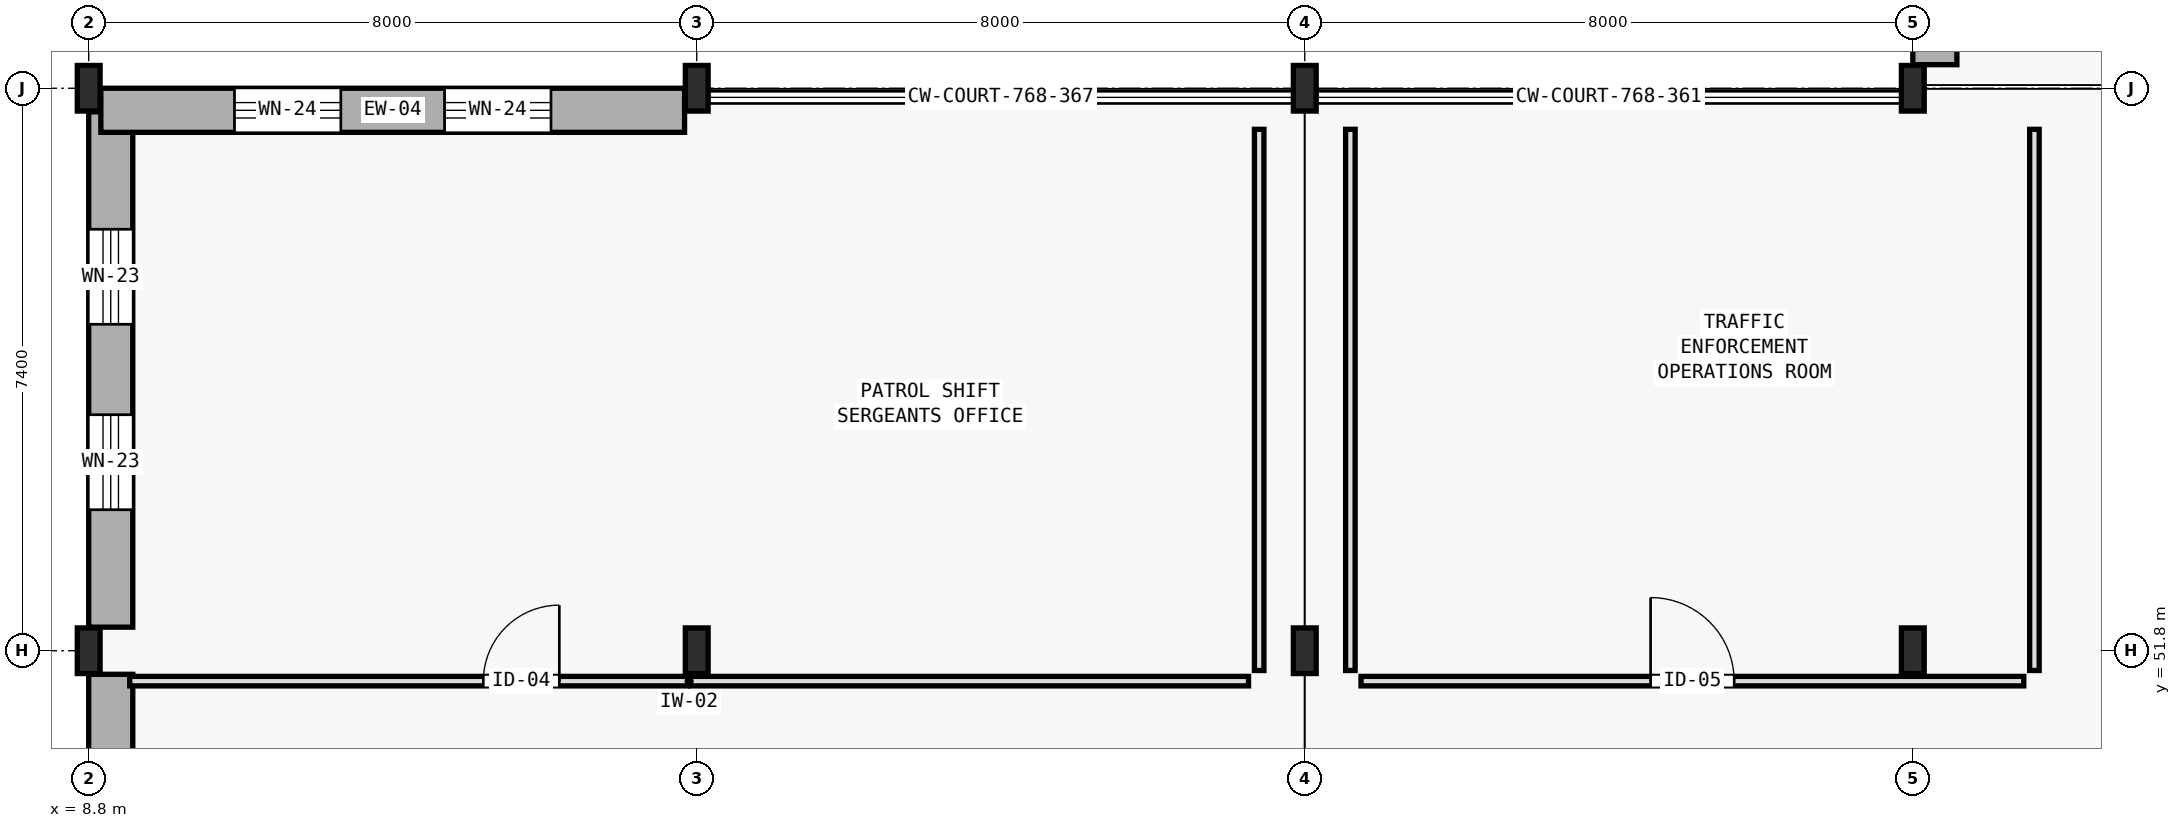
"""IFC4 building model, lengths in metres.
Left out: names, types, materials, properties, quantities, classifications, styles, units other than length and angle.
Written with IfcOpenShell. Run it as: python <this file> out.ifc"""

import sys

from ifc_helpers import new_model, si_unit, direction, frame, frame_2d, origin, origin_2d, place, context, subcontext, project, spatial, rectangle, i_section, extrude, element, fill, save


model = new_model("IFC4")
c1 = context("Model", 3, precision=1e-05, world=origin(), true_north=direction((0.0, 1.0)))
c2 = subcontext(c1, "Body", "Model", "MODEL_VIEW")
j1 = project(units=[si_unit("LENGTHUNIT", "METRE"), si_unit("PLANEANGLEUNIT", "RADIAN")], contexts=[c1])
p1 = place(None, origin())
s1 = spatial("IfcSite", under=j1, at=p1, CompositionType="ELEMENT")
p2 = place(p1, origin())
s2 = spatial("IfcBuilding", under=s1, at=p2, CompositionType="ELEMENT")
p3 = place(p2, frame((0.0, 0.0, 5.4)))
s3 = spatial("IfcBuildingStorey", under=s2, at=p3, CompositionType="ELEMENT", Elevation=5.4)
for number, where, z_axis, x_axis in (
    (1, (8.8, 51.8, 0.0), (0.0, 0.0, 1.0), (1.0, 0.0, 0.0)),
    (2, (8.8, 59.2, 0.0), (0.0, 0.0, 1.0), (1.0, 0.0, 0.0)),
    (3, (16.8, 51.8, 0.0), (0.0, 0.0, 1.0), (1.0, 0.0, 0.0)),
    (4, (16.8, 59.2, 0.0), (0.0, 0.0, 1.0), (1.0, 0.0, 0.0)),
    (5, (24.8, 51.8, 0.0), (0.0, 0.0, 1.0), (1.0, 0.0, 0.0)),
    (6, (24.8, 59.2, 0.0), (0.0, 0.0, 1.0), (1.0, 0.0, 0.0)),
    (7, (32.8, 51.8, 0.0), (0.0, 0.0, 1.0), (1.0, 0.0, 0.0)),
    (8, (32.8, 59.2, 0.0), (0.0, 0.0, 1.0), (1.0, 0.0, 0.0)),
):
    element("IfcColumn", number, at=place(p3, frame(where, z_axis=z_axis, x_axis=x_axis)), inside=s3, PredefinedType="COLUMN", context=c2, shape_type="SweptSolid", body=[
        extrude(i_section(OverallWidth=0.3, OverallDepth=0.6, WebThickness=0.015, FlangeThickness=0.03, FilletRadius=0.027, at=origin_2d()), origin(), (0.0, 0.0, 1.0), 4.5),
    ])
p4 = place(p3, frame((9.09, 44.71, 0.0), z_axis=(0.0, 0.0, 1.0), x_axis=(0.0, 1.0, 0.0)))
e9 = element("IfcWall", 9, at=p4, inside=s3, PredefinedType="STANDARD", context=c2, shape_type="SweptSolid", body=[
    extrude(rectangle(XDim=6.78, YDim=0.58, at=frame_2d((3.39, 0.0))), origin(), (0.0, 0.0, 1.0), 4.24),
])
p5 = place(p4, frame((1.545, 0.0, 0.9)))
e10 = element("IfcOpeningElement", 10, at=p5, cuts=e9, PredefinedType="OPENING", context=c2, shape_type="SweptSolid", body=[
    extrude(rectangle(XDim=1.25, YDim=2.05, at=frame_2d((0.625, 1.025))), frame((0.0, 0.3, 0.0), z_axis=(0.0, -1.0, 0.0), x_axis=(1.0, 0.0, 0.0)), (0.0, 0.0, 1.0), 0.6),
])
p6 = place(p4, frame((3.985, 0.0, 0.9)))
e11 = element("IfcOpeningElement", 11, at=p6, cuts=e9, PredefinedType="OPENING", context=c2, shape_type="SweptSolid", body=[
    extrude(rectangle(XDim=1.25, YDim=2.05, at=frame_2d((0.625, 1.025))), frame((0.0, 0.3, 0.0), z_axis=(0.0, -1.0, 0.0), x_axis=(1.0, 0.0, 0.0)), (0.0, 0.0, 1.0), 0.6),
])
p7 = place(p3, frame((9.09, 52.11, 0.0), z_axis=(0.0, 0.0, 1.0), x_axis=(0.0, 1.0, 0.0)))
e12 = element("IfcWall", 12, at=p7, inside=s3, PredefinedType="STANDARD", context=c2, shape_type="SweptSolid", body=[
    extrude(rectangle(XDim=6.78, YDim=0.58, at=frame_2d((3.39, 0.0))), origin(), (0.0, 0.0, 1.0), 4.24),
])
p8 = place(p7, frame((1.545, 0.0, 0.9)))
e13 = element("IfcOpeningElement", 13, at=p8, cuts=e12, PredefinedType="OPENING", context=c2, shape_type="SweptSolid", body=[
    extrude(rectangle(XDim=1.25, YDim=2.45, at=frame_2d((0.625, 1.225))), frame((0.0, 0.3, 0.0), z_axis=(0.0, -1.0, 0.0), x_axis=(1.0, 0.0, 0.0)), (0.0, 0.0, 1.0), 0.6),
])
p9 = place(p7, frame((3.985, 0.0, 0.9)))
e14 = element("IfcOpeningElement", 14, at=p9, cuts=e12, PredefinedType="OPENING", context=c2, shape_type="SweptSolid", body=[
    extrude(rectangle(XDim=1.25, YDim=2.45, at=frame_2d((0.625, 1.225))), frame((0.0, 0.3, 0.0), z_axis=(0.0, -1.0, 0.0), x_axis=(1.0, 0.0, 0.0)), (0.0, 0.0, 1.0), 0.6),
])
p10 = place(p3, frame((8.96, 58.91, 0.0), z_axis=(0.0, 0.0, 1.0), x_axis=(1.0, 0.0, 0.0)))
e15 = element("IfcWall", 15, at=p10, inside=s3, PredefinedType="STANDARD", context=c2, shape_type="SweptSolid", body=[
    extrude(rectangle(XDim=7.68, YDim=0.58, at=frame_2d((3.84, 0.0))), origin(), (0.0, 0.0, 1.0), 4.24),
])
p11 = place(p10, frame((1.758, 0.0, 0.9)))
e16 = element("IfcOpeningElement", 16, at=p11, cuts=e15, PredefinedType="OPENING", context=c2, shape_type="SweptSolid", body=[
    extrude(rectangle(XDim=1.4, YDim=1.75, at=frame_2d((0.7, 0.875))), frame((0.0, 0.3, 0.0), z_axis=(0.0, -1.0, 0.0), x_axis=(1.0, 0.0, 0.0)), (0.0, 0.0, 1.0), 0.6),
])
p12 = place(p10, frame((4.522, 0.0, 0.9)))
e17 = element("IfcOpeningElement", 17, at=p12, cuts=e15, PredefinedType="OPENING", context=c2, shape_type="SweptSolid", body=[
    extrude(rectangle(XDim=1.4, YDim=1.75, at=frame_2d((0.7, 0.875))), frame((0.0, 0.3, 0.0), z_axis=(0.0, -1.0, 0.0), x_axis=(1.0, 0.0, 0.0)), (0.0, 0.0, 1.0), 0.6),
])
p13 = place(p3, frame((33.09, 59.51, 0.0), z_axis=(0.0, 0.0, 1.0), x_axis=(0.0, 1.0, 0.0)))
e18 = element("IfcWall", 18, at=p13, inside=s3, PredefinedType="STANDARD", context=c2, shape_type="SweptSolid", body=[
    extrude(rectangle(XDim=7.09, YDim=0.58, at=frame_2d((3.545, 0.0))), origin(), (0.0, 0.0, 1.0), 4.17),
])
p14 = place(p13, frame((1.494, 0.0, 0.9)))
e19 = element("IfcOpeningElement", 19, at=p14, cuts=e18, PredefinedType="OPENING", context=c2, shape_type="SweptSolid", body=[
    extrude(rectangle(XDim=1.4, YDim=2.15, at=frame_2d((0.7, 1.075))), frame((0.0, 0.3, 0.0), z_axis=(0.0, -1.0, 0.0), x_axis=(1.0, 0.0, 0.0)), (0.0, 0.0, 1.0), 0.6),
])
p15 = place(p13, frame((3.961, 0.0, 0.9)))
e20 = element("IfcOpeningElement", 20, at=p15, cuts=e18, PredefinedType="OPENING", context=c2, shape_type="SweptSolid", body=[
    extrude(rectangle(XDim=1.4, YDim=2.15, at=frame_2d((0.7, 1.075))), frame((0.0, 0.3, 0.0), z_axis=(0.0, -1.0, 0.0), x_axis=(1.0, 0.0, 0.0)), (0.0, 0.0, 1.0), 0.6),
])
p16 = place(p3, frame((9.34, 51.4, 0.0), z_axis=(0.0, 0.0, 1.0), x_axis=(1.0, 0.0, 0.0)))
e21 = element("IfcWall", 21, at=p16, inside=s3, PredefinedType="PARTITIONING", context=c2, shape_type="SweptSolid", body=[
    extrude(rectangle(XDim=14.72, YDim=0.125, at=frame_2d((7.36, 0.0))), origin(), (0.0, 0.0, 1.0), 3.73),
])
p17 = place(p16, frame((4.652, 0.0, 0.0)))
e22 = element("IfcOpeningElement", 22, at=p17, cuts=e21, PredefinedType="OPENING", context=c2, shape_type="SweptSolid", body=[
    extrude(rectangle(XDim=1.0, YDim=2.2, at=frame_2d((0.5, 1.1))), frame((0.0, 0.073, 0.0), z_axis=(0.0, -1.0, 0.0), x_axis=(1.0, 0.0, 0.0)), (0.0, 0.0, 1.0), 0.145),
])
p18 = place(p3, frame((24.2, 51.54, 0.0), z_axis=(0.0, 0.0, 1.0), x_axis=(0.0, 1.0, 0.0)))
e23 = element("IfcWall", 23, at=p18, inside=s3, PredefinedType="PARTITIONING", context=c2, shape_type="SweptSolid", body=[
    extrude(rectangle(XDim=7.12, YDim=0.125, at=frame_2d((3.56, 0.0))), origin(), (0.0, 0.0, 1.0), 3.67),
])
p19 = place(p3, frame((25.54, 51.4, 0.0), z_axis=(0.0, 0.0, 1.0), x_axis=(1.0, 0.0, 0.0)))
e24 = element("IfcWall", 24, at=p19, inside=s3, PredefinedType="PARTITIONING", context=c2, shape_type="SweptSolid", body=[
    extrude(rectangle(XDim=8.72, YDim=0.125, at=frame_2d((4.36, 0.0))), origin(), (0.0, 0.0, 1.0), 3.73),
])
p20 = place(p19, frame((3.81, 0.0, 0.0)))
e25 = element("IfcOpeningElement", 25, at=p20, cuts=e24, PredefinedType="OPENING", context=c2, shape_type="SweptSolid", body=[
    extrude(rectangle(XDim=1.1, YDim=2.2, at=frame_2d((0.55, 1.1))), frame((0.0, 0.073, 0.0), z_axis=(0.0, -1.0, 0.0), x_axis=(1.0, 0.0, 0.0)), (0.0, 0.0, 1.0), 0.145),
])
p21 = place(p3, frame((25.4, 51.54, 0.0), z_axis=(0.0, 0.0, 1.0), x_axis=(0.0, 1.0, 0.0)))
e26 = element("IfcWall", 26, at=p21, inside=s3, PredefinedType="PARTITIONING", context=c2, shape_type="SweptSolid", body=[
    extrude(rectangle(XDim=7.12, YDim=0.125, at=frame_2d((3.56, 0.0))), origin(), (0.0, 0.0, 1.0), 3.67),
])
p22 = place(p3, frame((34.4, 51.54, 0.0), z_axis=(0.0, 0.0, 1.0), x_axis=(0.0, 1.0, 0.0)))
e27 = element("IfcWall", 27, at=p22, inside=s3, PredefinedType="PARTITIONING", context=c2, shape_type="SweptSolid", body=[
    extrude(rectangle(XDim=7.12, YDim=0.125, at=frame_2d((3.56, 0.0))), origin(), (0.0, 0.0, 1.0), 4.17),
])
p23 = place(p8, origin())
e28 = element("IfcWindow", 28, at=p23, inside=s3, PartitioningType="SINGLE_PANEL", PredefinedType="WINDOW", context=c2, shape_type="SweptSolid", body=[
    extrude(rectangle(XDim=1.25, YDim=2.45, at=frame_2d((0.625, 1.225))), frame((0.0, 0.03, 0.0), z_axis=(0.0, -1.0, 0.0), x_axis=(1.0, 0.0, 0.0)), (0.0, 0.0, 1.0), 0.06),
])
fill(e13, e28)
p24 = place(p9, origin())
e29 = element("IfcWindow", 29, at=p24, inside=s3, PartitioningType="SINGLE_PANEL", PredefinedType="WINDOW", context=c2, shape_type="SweptSolid", body=[
    extrude(rectangle(XDim=1.25, YDim=2.45, at=frame_2d((0.625, 1.225))), frame((0.0, 0.03, 0.0), z_axis=(0.0, -1.0, 0.0), x_axis=(1.0, 0.0, 0.0)), (0.0, 0.0, 1.0), 0.06),
])
fill(e14, e29)
p25 = place(p11, origin())
e30 = element("IfcWindow", 30, at=p25, inside=s3, PartitioningType="SINGLE_PANEL", PredefinedType="WINDOW", context=c2, shape_type="SweptSolid", body=[
    extrude(rectangle(XDim=1.4, YDim=1.75, at=frame_2d((0.7, 0.875))), frame((0.0, 0.03, 0.0), z_axis=(0.0, -1.0, 0.0), x_axis=(1.0, 0.0, 0.0)), (0.0, 0.0, 1.0), 0.06),
])
fill(e16, e30)
p26 = place(p12, origin())
e31 = element("IfcWindow", 31, at=p26, inside=s3, PartitioningType="SINGLE_PANEL", PredefinedType="WINDOW", context=c2, shape_type="SweptSolid", body=[
    extrude(rectangle(XDim=1.4, YDim=1.75, at=frame_2d((0.7, 0.875))), frame((0.0, 0.03, 0.0), z_axis=(0.0, -1.0, 0.0), x_axis=(1.0, 0.0, 0.0)), (0.0, 0.0, 1.0), 0.06),
])
fill(e17, e31)
p27 = place(p17, origin())
e32 = element("IfcDoor", 32, at=p27, inside=s3, OperationType="SINGLE_SWING_RIGHT", PredefinedType="DOOR", context=c2, shape_type="SweptSolid", body=[
    extrude(rectangle(XDim=1.0, YDim=2.2, at=frame_2d((0.5, 1.1))), frame((0.0, 0.025, 0.0), z_axis=(0.0, -1.0, 0.0), x_axis=(1.0, 0.0, 0.0)), (0.0, 0.0, 1.0), 0.05),
])
fill(e22, e32)
p28 = place(p20, origin())
e33 = element("IfcDoor", 33, at=p28, inside=s3, OperationType="SINGLE_SWING_LEFT", PredefinedType="DOOR", context=c2, shape_type="SweptSolid", body=[
    extrude(rectangle(XDim=1.1, YDim=2.2, at=frame_2d((0.55, 1.1))), frame((0.0, 0.025, 0.0), z_axis=(0.0, -1.0, 0.0), x_axis=(1.0, 0.0, 0.0)), (0.0, 0.0, 1.0), 0.05),
])
fill(e25, e33)
save(model, sys.argv[1])
